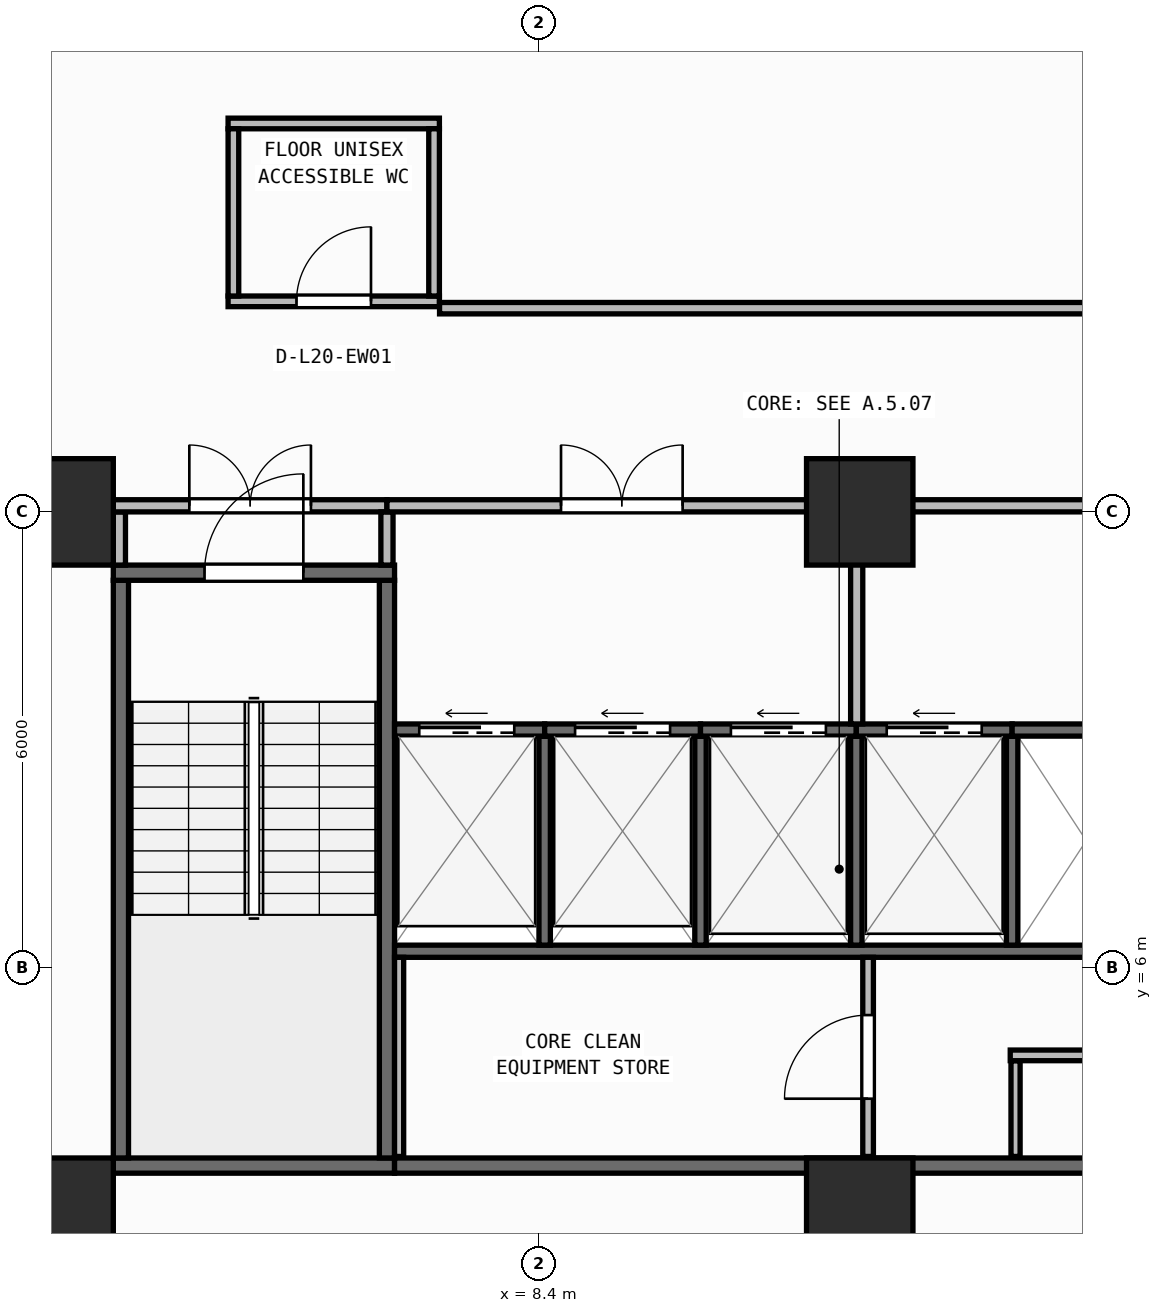
"""IFC4 building model, lengths in metres.
Left out: names, types, materials, properties, quantities, classifications, styles, units other than length and angle.
Written with IfcOpenShell. Run it as: python <this file> out.ifc"""

import sys

from ifc_helpers import new_model, si_unit, direction, frame, frame_2d, origin, origin_2d, place, context, subcontext, project, spatial, rectangle, extrude, element, fill, save


model = new_model("IFC4")
c1 = context("Model", 3, precision=1e-05, world=origin(), true_north=direction((0.0, 1.0)))
c2 = subcontext(c1, "Body", "Model", "MODEL_VIEW")
j1 = project(units=[si_unit("LENGTHUNIT", "METRE"), si_unit("PLANEANGLEUNIT", "RADIAN")], contexts=[c1])
p1 = place(None, origin())
s1 = spatial("IfcSite", under=j1, at=p1, CompositionType="ELEMENT")
p2 = place(p1, origin())
s2 = spatial("IfcBuilding", under=s1, at=p2, CompositionType="ELEMENT")
p3 = place(p2, frame((0.0, 0.0, 81.75)))
s3 = spatial("IfcBuildingStorey", under=s2, at=p3, CompositionType="ELEMENT", Elevation=81.75)
for number, where, z_axis, x_axis in (
    (1, (2.1, 2.8, 0.0), (0.0, 0.0, 1.0), (1.0, 0.0, 0.0)),
    (2, (12.62, 2.8, 0.0), (0.0, 0.0, 1.0), (1.0, 0.0, 0.0)),
    (3, (2.1, 12.0, 0.0), (0.0, 0.0, 1.0), (1.0, 0.0, 0.0)),
    (4, (12.62, 12.0, 0.0), (0.0, 0.0, 1.0), (1.0, 0.0, 0.0)),
):
    element("IfcColumn", number, at=place(p3, frame(where, z_axis=z_axis, x_axis=x_axis)), inside=s3, PredefinedType="COLUMN", context=c2, shape_type="SweptSolid", body=[
        extrude(rectangle(XDim=1.4, YDim=1.4, at=origin_2d()), origin(), (0.0, 0.0, 1.0), 3.95),
    ])
p4 = place(p3, frame((2.76, 0.174, 0.0), z_axis=(0.0, 0.0, 1.0), x_axis=(0.996571478456, 0.082736257641, 0.0)))
e5 = element("IfcWall", 5, at=p4, inside=s3, PredefinedType="STANDARD", context=c2, shape_type="SweptSolid", body=[
    extrude(rectangle(XDim=52.861, YDim=0.26, at=frame_2d((26.431, 0.0))), origin(), (0.0, 0.0, 1.0), 3.71),
])
p5 = place(p4, frame((25.231, 0.0, 0.9)))
e6 = element("IfcOpeningElement", 6, at=p5, cuts=e5, PredefinedType="OPENING", context=c2, shape_type="SweptSolid", body=[
    extrude(rectangle(XDim=2.4, YDim=1.65, at=frame_2d((1.2, 0.825))), frame((0.0, 0.14, 0.0), z_axis=(0.0, -1.0, 0.0), x_axis=(1.0, 0.0, 0.0)), (0.0, 0.0, 1.0), 0.28),
])
p6 = place(p3, frame((2.8, 3.4, 0.0), z_axis=(0.0, 0.0, 1.0), x_axis=(1.0, 0.0, 0.0)))
e7 = element("IfcWall", 7, at=p6, inside=s3, PredefinedType="SHEAR", context=c2, shape_type="SweptSolid", body=[
    extrude(rectangle(XDim=3.7, YDim=0.2, at=frame_2d((1.85, 0.0))), origin(), (0.0, 0.0, 1.0), 3.71),
])
for number, where, z_axis, x_axis in (
    (8, (2.9, 3.5, 0.0), (0.0, 0.0, 1.0), (0.0, 1.0, 0.0)),
    (9, (6.4, 3.5, 0.0), (0.0, 0.0, 1.0), (0.0, 1.0, 0.0)),
):
    element("IfcWall", number, at=place(p3, frame(where, z_axis=z_axis, x_axis=x_axis)), inside=s3, PredefinedType="SHEAR", context=c2, shape_type="SweptSolid", body=[
        extrude(rectangle(XDim=7.6, YDim=0.2, at=frame_2d((3.8, 0.0))), origin(), (0.0, 0.0, 1.0), 3.71),
    ])
p7 = place(p3, frame((2.8, 11.2, 0.0), z_axis=(0.0, 0.0, 1.0), x_axis=(1.0, 0.0, 0.0)))
e10 = element("IfcWall", 10, at=p7, inside=s3, PredefinedType="SHEAR", context=c2, shape_type="SweptSolid", body=[
    extrude(rectangle(XDim=3.7, YDim=0.2, at=frame_2d((1.85, 0.0))), origin(), (0.0, 0.0, 1.0), 3.71),
])
p8 = place(p7, frame((1.2, 0.0, 0.0)))
e11 = element("IfcOpeningElement", 11, at=p8, cuts=e10, PredefinedType="OPENING", context=c2, shape_type="SweptSolid", body=[
    extrude(rectangle(XDim=1.3, YDim=2.15, at=frame_2d((0.65, 1.075))), frame((0.0, 0.11, 0.0), z_axis=(0.0, -1.0, 0.0), x_axis=(1.0, 0.0, 0.0)), (0.0, 0.0, 1.0), 0.22),
])
p9 = place(p3, frame((6.5, 3.4, 0.0), z_axis=(0.0, 0.0, 1.0), x_axis=(1.0, 0.0, 0.0)))
e12 = element("IfcWall", 12, at=p9, inside=s3, PredefinedType="SHEAR", context=c2, shape_type="SweptSolid", body=[
    extrude(rectangle(XDim=13.7, YDim=0.2, at=frame_2d((6.85, 0.0))), origin(), (0.0, 0.0, 1.0), 3.71),
])
p10 = place(p3, frame((6.5, 6.22, 0.0), z_axis=(0.0, 0.0, 1.0), x_axis=(1.0, 0.0, 0.0)))
e13 = element("IfcWall", 13, at=p10, inside=s3, PredefinedType="SHEAR", context=c2, shape_type="SweptSolid", body=[
    extrude(rectangle(XDim=12.11, YDim=0.16, at=frame_2d((6.055, 0.0))), origin(), (0.0, 0.0, 1.0), 3.71),
])
for number, where, z_axis, x_axis in (
    (14, (8.475, 6.3, 0.0), (0.0, 0.0, 1.0), (0.0, 1.0, 0.0)),
    (15, (10.525, 6.3, 0.0), (0.0, 0.0, 1.0), (0.0, 1.0, 0.0)),
    (16, (12.575, 6.3, 0.0), (0.0, 0.0, 1.0), (0.0, 1.0, 0.0)),
    (17, (14.625, 6.3, 0.0), (0.0, 0.0, 1.0), (0.0, 1.0, 0.0)),
):
    element("IfcWall", number, at=place(p3, frame(where, z_axis=z_axis, x_axis=x_axis)), inside=s3, PredefinedType="SHEAR", context=c2, shape_type="SweptSolid", body=[
        extrude(rectangle(XDim=2.75, YDim=0.15, at=frame_2d((1.375, 0.0))), origin(), (0.0, 0.0, 1.0), 3.71),
    ])
p11 = place(p3, frame((6.5, 9.13, 0.0), z_axis=(0.0, 0.0, 1.0), x_axis=(1.0, 0.0, 0.0)))
e18 = element("IfcWall", 18, at=p11, inside=s3, PredefinedType="SHEAR", context=c2, shape_type="SweptSolid", body=[
    extrude(rectangle(XDim=1.975, YDim=0.16, at=frame_2d((0.988, 0.0))), origin(), (0.0, 0.0, 1.0), 3.71),
])
p12 = place(p11, frame((0.325, 0.0, 0.0)))
e19 = element("IfcOpeningElement", 19, at=p12, cuts=e18, PredefinedType="OPENING", context=c2, shape_type="SweptSolid", body=[
    extrude(rectangle(XDim=1.25, YDim=2.15, at=frame_2d((0.625, 1.075))), frame((0.0, 0.09, 0.0), z_axis=(0.0, -1.0, 0.0), x_axis=(1.0, 0.0, 0.0)), (0.0, 0.0, 1.0), 0.18),
])
p13 = place(p3, frame((8.475, 9.13, 0.0), z_axis=(0.0, 0.0, 1.0), x_axis=(1.0, 0.0, 0.0)))
e20 = element("IfcWall", 20, at=p13, inside=s3, PredefinedType="SHEAR", context=c2, shape_type="SweptSolid", body=[
    extrude(rectangle(XDim=2.05, YDim=0.16, at=frame_2d((1.025, 0.0))), origin(), (0.0, 0.0, 1.0), 3.71),
])
p14 = place(p13, frame((0.4, 0.0, 0.0)))
e21 = element("IfcOpeningElement", 21, at=p14, cuts=e20, PredefinedType="OPENING", context=c2, shape_type="SweptSolid", body=[
    extrude(rectangle(XDim=1.25, YDim=2.15, at=frame_2d((0.625, 1.075))), frame((0.0, 0.09, 0.0), z_axis=(0.0, -1.0, 0.0), x_axis=(1.0, 0.0, 0.0)), (0.0, 0.0, 1.0), 0.18),
])
p15 = place(p3, frame((10.525, 9.13, 0.0), z_axis=(0.0, 0.0, 1.0), x_axis=(1.0, 0.0, 0.0)))
e22 = element("IfcWall", 22, at=p15, inside=s3, PredefinedType="SHEAR", context=c2, shape_type="SweptSolid", body=[
    extrude(rectangle(XDim=2.05, YDim=0.16, at=frame_2d((1.025, 0.0))), origin(), (0.0, 0.0, 1.0), 3.71),
])
p16 = place(p15, frame((0.4, 0.0, 0.0)))
e23 = element("IfcOpeningElement", 23, at=p16, cuts=e22, PredefinedType="OPENING", context=c2, shape_type="SweptSolid", body=[
    extrude(rectangle(XDim=1.25, YDim=2.15, at=frame_2d((0.625, 1.075))), frame((0.0, 0.09, 0.0), z_axis=(0.0, -1.0, 0.0), x_axis=(1.0, 0.0, 0.0)), (0.0, 0.0, 1.0), 0.18),
])
p17 = place(p3, frame((12.575, 9.13, 0.0), z_axis=(0.0, 0.0, 1.0), x_axis=(1.0, 0.0, 0.0)))
e24 = element("IfcWall", 24, at=p17, inside=s3, PredefinedType="SHEAR", context=c2, shape_type="SweptSolid", body=[
    extrude(rectangle(XDim=2.05, YDim=0.16, at=frame_2d((1.025, 0.0))), origin(), (0.0, 0.0, 1.0), 3.71),
])
p18 = place(p17, frame((0.4, 0.0, 0.0)))
e25 = element("IfcOpeningElement", 25, at=p18, cuts=e24, PredefinedType="OPENING", context=c2, shape_type="SweptSolid", body=[
    extrude(rectangle(XDim=1.25, YDim=2.15, at=frame_2d((0.625, 1.075))), frame((0.0, 0.09, 0.0), z_axis=(0.0, -1.0, 0.0), x_axis=(1.0, 0.0, 0.0)), (0.0, 0.0, 1.0), 0.18),
])
p19 = place(p3, frame((14.625, 9.13, 0.0), z_axis=(0.0, 0.0, 1.0), x_axis=(1.0, 0.0, 0.0)))
e26 = element("IfcWall", 26, at=p19, inside=s3, PredefinedType="SHEAR", context=c2, shape_type="SweptSolid", body=[
    extrude(rectangle(XDim=1.95, YDim=0.16, at=frame_2d((0.975, 0.0))), origin(), (0.0, 0.0, 1.0), 3.71),
])
p20 = place(p3, frame((6.56, 3.52, 0.0), z_axis=(0.0, 0.0, 1.0), x_axis=(0.0, 1.0, 0.0)))
e27 = element("IfcWall", 27, at=p20, inside=s3, PredefinedType="PARTITIONING", context=c2, shape_type="SweptSolid", body=[
    extrude(rectangle(XDim=2.62, YDim=0.12, at=frame_2d((1.31, 0.0))), origin(), (0.0, 0.0, 1.0), 3.71),
])
p21 = place(p3, frame((12.73, 3.52, 0.0), z_axis=(0.0, 0.0, 1.0), x_axis=(0.0, 1.0, 0.0)))
e28 = element("IfcWall", 28, at=p21, inside=s3, PredefinedType="PARTITIONING", context=c2, shape_type="SweptSolid", body=[
    extrude(rectangle(XDim=2.62, YDim=0.14, at=frame_2d((1.31, 0.0))), origin(), (0.0, 0.0, 1.0), 3.71),
])
p22 = place(p21, frame((0.76, 0.0, 0.0)))
e29 = element("IfcOpeningElement", 29, at=p22, cuts=e28, PredefinedType="OPENING", context=c2, shape_type="SweptSolid", body=[
    extrude(rectangle(XDim=1.1, YDim=2.1, at=frame_2d((0.55, 1.05))), frame((0.0, 0.08, 0.0), z_axis=(0.0, -1.0, 0.0), x_axis=(1.0, 0.0, 0.0)), (0.0, 0.0, 1.0), 0.16),
])
p23 = place(p3, frame((14.67, 3.52, 0.0), z_axis=(0.0, 0.0, 1.0), x_axis=(0.0, 1.0, 0.0)))
e30 = element("IfcWall", 30, at=p23, inside=s3, PredefinedType="PARTITIONING", context=c2, shape_type="SweptSolid", body=[
    extrude(rectangle(XDim=1.26, YDim=0.12, at=frame_2d((0.63, 0.0))), origin(), (0.0, 0.0, 1.0), 3.71),
])
p24 = place(p3, frame((14.6, 4.85, 0.0), z_axis=(0.0, 0.0, 1.0), x_axis=(1.0, 0.0, 0.0)))
e31 = element("IfcWall", 31, at=p24, inside=s3, PredefinedType="PARTITIONING", context=c2, shape_type="SweptSolid", body=[
    extrude(rectangle(XDim=4.0, YDim=0.14, at=frame_2d((2.0, 0.0))), origin(), (0.0, 0.0, 1.0), 3.71),
])
p25 = place(p24, frame((1.51, 0.0, 0.0)))
e32 = element("IfcOpeningElement", 32, at=p25, cuts=e31, PredefinedType="OPENING", context=c2, shape_type="SweptSolid", body=[
    extrude(rectangle(XDim=0.98, YDim=2.1, at=frame_2d((0.49, 1.05))), frame((0.0, 0.08, 0.0), z_axis=(0.0, -1.0, 0.0), x_axis=(1.0, 0.0, 0.0)), (0.0, 0.0, 1.0), 0.16),
])
p26 = place(p3, frame((2.88, 11.3, 0.0), z_axis=(0.0, 0.0, 1.0), x_axis=(0.0, 1.0, 0.0)))
e33 = element("IfcWall", 33, at=p26, inside=s3, PredefinedType="PARTITIONING", context=c2, shape_type="SweptSolid", body=[
    extrude(rectangle(XDim=0.7, YDim=0.16, at=frame_2d((0.35, 0.0))), origin(), (0.0, 0.0, 1.0), 3.71),
])
p27 = place(p3, frame((2.8, 12.08, 0.0), z_axis=(0.0, 0.0, 1.0), x_axis=(1.0, 0.0, 0.0)))
e34 = element("IfcWall", 34, at=p27, inside=s3, PredefinedType="PARTITIONING", context=c2, shape_type="SweptSolid", body=[
    extrude(rectangle(XDim=3.6, YDim=0.16, at=frame_2d((1.8, 0.0))), origin(), (0.0, 0.0, 1.0), 3.073),
])
p28 = place(p27, frame((1.0, 0.0, 0.0)))
e35 = element("IfcOpeningElement", 35, at=p28, cuts=e34, PredefinedType="OPENING", context=c2, shape_type="SweptSolid", body=[
    extrude(rectangle(XDim=1.6, YDim=2.05, at=frame_2d((0.8, 1.025))), frame((0.0, 0.09, 0.0), z_axis=(0.0, -1.0, 0.0), x_axis=(1.0, 0.0, 0.0)), (0.0, 0.0, 1.0), 0.18),
])
p29 = place(p3, frame((6.4, 11.3, 0.0), z_axis=(0.0, 0.0, 1.0), x_axis=(0.0, 1.0, 0.0)))
e36 = element("IfcWall", 36, at=p29, inside=s3, PredefinedType="PARTITIONING", context=c2, shape_type="SweptSolid", body=[
    extrude(rectangle(XDim=0.7, YDim=0.16, at=frame_2d((0.35, 0.0))), origin(), (0.0, 0.0, 1.0), 3.71),
])
p30 = place(p3, frame((6.4, 12.08, 0.0), z_axis=(0.0, 0.0, 1.0), x_axis=(1.0, 0.0, 0.0)))
e37 = element("IfcWall", 37, at=p30, inside=s3, PredefinedType="PARTITIONING", context=c2, shape_type="SweptSolid", body=[
    extrude(rectangle(XDim=6.18, YDim=0.16, at=frame_2d((3.09, 0.0))), origin(), (0.0, 0.0, 1.0), 3.073),
])
p31 = place(p30, frame((2.29, 0.0, 0.0)))
e38 = element("IfcOpeningElement", 38, at=p31, cuts=e37, PredefinedType="OPENING", context=c2, shape_type="SweptSolid", body=[
    extrude(rectangle(XDim=1.6, YDim=2.05, at=frame_2d((0.8, 1.025))), frame((0.0, 0.09, 0.0), z_axis=(0.0, -1.0, 0.0), x_axis=(1.0, 0.0, 0.0)), (0.0, 0.0, 1.0), 0.18),
])
p32 = place(p3, frame((12.58, 9.21, 0.0), z_axis=(0.0, 0.0, 1.0), x_axis=(0.0, 1.0, 0.0)))
e39 = element("IfcWall", 39, at=p32, inside=s3, PredefinedType="PARTITIONING", context=c2, shape_type="SweptSolid", body=[
    extrude(rectangle(XDim=2.79, YDim=0.16, at=frame_2d((1.395, 0.0))), origin(), (0.0, 0.0, 1.0), 3.71),
])
p33 = place(p3, frame((12.58, 12.08, 0.0), z_axis=(0.0, 0.0, 1.0), x_axis=(1.0, 0.0, 0.0)))
e40 = element("IfcWall", 40, at=p33, inside=s3, PredefinedType="PARTITIONING", context=c2, shape_type="SweptSolid", body=[
    extrude(rectangle(XDim=7.7, YDim=0.16, at=frame_2d((3.85, 0.0))), origin(), (0.0, 0.0, 1.0), 3.073),
])
p34 = place(p33, frame((3.05, 0.0, 0.0)))
e41 = element("IfcOpeningElement", 41, at=p34, cuts=e40, PredefinedType="OPENING", context=c2, shape_type="SweptSolid", body=[
    extrude(rectangle(XDim=1.6, YDim=2.05, at=frame_2d((0.8, 1.025))), frame((0.0, 0.09, 0.0), z_axis=(0.0, -1.0, 0.0), x_axis=(1.0, 0.0, 0.0)), (0.0, 0.0, 1.0), 0.18),
])
p35 = place(p3, frame((4.31, 14.77, 0.0), z_axis=(0.0, 0.0, 1.0), x_axis=(1.0, 0.0, 0.0)))
e42 = element("IfcWall", 42, at=p35, inside=s3, PredefinedType="PARTITIONING", context=c2, shape_type="SweptSolid", body=[
    extrude(rectangle(XDim=2.78, YDim=0.14, at=frame_2d((1.39, 0.0))), origin(), (0.0, 0.0, 1.0), 3.71),
])
p36 = place(p35, frame((0.9, 0.0, 0.0)))
e43 = element("IfcOpeningElement", 43, at=p36, cuts=e42, PredefinedType="OPENING", context=c2, shape_type="SweptSolid", body=[
    extrude(rectangle(XDim=0.98, YDim=2.1, at=frame_2d((0.49, 1.05))), frame((0.0, 0.08, 0.0), z_axis=(0.0, -1.0, 0.0), x_axis=(1.0, 0.0, 0.0)), (0.0, 0.0, 1.0), 0.16),
])
p37 = place(p3, frame((4.31, 17.11, 0.0), z_axis=(0.0, 0.0, 1.0), x_axis=(1.0, 0.0, 0.0)))
e44 = element("IfcWall", 44, at=p37, inside=s3, PredefinedType="PARTITIONING", context=c2, shape_type="SweptSolid", body=[
    extrude(rectangle(XDim=2.78, YDim=0.14, at=frame_2d((1.39, 0.0))), origin(), (0.0, 0.0, 1.0), 3.71),
])
for number, where, z_axis, x_axis in (
    (45, (4.38, 14.84, 0.0), (0.0, 0.0, 1.0), (0.0, 1.0, 0.0)),
    (46, (7.02, 14.84, 0.0), (0.0, 0.0, 1.0), (0.0, 1.0, 0.0)),
):
    element("IfcWall", number, at=place(p3, frame(where, z_axis=z_axis, x_axis=x_axis)), inside=s3, PredefinedType="PARTITIONING", context=c2, shape_type="SweptSolid", body=[
        extrude(rectangle(XDim=2.2, YDim=0.14, at=frame_2d((1.1, 0.0))), origin(), (0.0, 0.0, 1.0), 3.71),
    ])
p38 = place(p3, frame((27.546, 14.68, 0.0), z_axis=(0.0, 0.0, 1.0), x_axis=(-1.0, 0.0, 0.0)))
e47 = element("IfcWall", 47, at=p38, inside=s3, PredefinedType="PARTITIONING", context=c2, shape_type="SweptSolid", body=[
    extrude(rectangle(XDim=20.454, YDim=0.15, at=frame_2d((10.227, 0.0))), origin(), (0.0, 0.0, 1.0), 3.71),
])
p39 = place(p38, frame((9.677, 0.0, 0.0)))
e48 = element("IfcOpeningElement", 48, at=p39, cuts=e47, PredefinedType="OPENING", context=c2, shape_type="SweptSolid", body=[
    extrude(rectangle(XDim=1.1, YDim=2.1, at=frame_2d((0.55, 1.05))), frame((0.0, 0.085, 0.0), z_axis=(0.0, -1.0, 0.0), x_axis=(1.0, 0.0, 0.0)), (0.0, 0.0, 1.0), 0.17),
])
p40 = place(p8, origin())
e49 = element("IfcDoor", 49, at=p40, inside=s3, OperationType="SINGLE_SWING_RIGHT", PredefinedType="DOOR", context=c2, shape_type="SweptSolid", body=[
    extrude(rectangle(XDim=1.3, YDim=2.15, at=frame_2d((0.65, 1.075))), frame((0.0, 0.025, 0.0), z_axis=(0.0, -1.0, 0.0), x_axis=(1.0, 0.0, 0.0)), (0.0, 0.0, 1.0), 0.05),
])
fill(e11, e49)
p41 = place(p12, origin())
e50 = element("IfcDoor", 50, at=p41, inside=s3, OperationType="SLIDING_TO_LEFT", PredefinedType="DOOR", context=c2, shape_type="SweptSolid", body=[
    extrude(rectangle(XDim=1.25, YDim=2.15, at=frame_2d((0.625, 1.075))), frame((0.0, 0.025, 0.0), z_axis=(0.0, -1.0, 0.0), x_axis=(1.0, 0.0, 0.0)), (0.0, 0.0, 1.0), 0.05),
])
fill(e19, e50)
p42 = place(p14, origin())
e51 = element("IfcDoor", 51, at=p42, inside=s3, OperationType="SLIDING_TO_LEFT", PredefinedType="DOOR", context=c2, shape_type="SweptSolid", body=[
    extrude(rectangle(XDim=1.25, YDim=2.15, at=frame_2d((0.625, 1.075))), frame((0.0, 0.025, 0.0), z_axis=(0.0, -1.0, 0.0), x_axis=(1.0, 0.0, 0.0)), (0.0, 0.0, 1.0), 0.05),
])
fill(e21, e51)
p43 = place(p16, origin())
e52 = element("IfcDoor", 52, at=p43, inside=s3, OperationType="SLIDING_TO_LEFT", PredefinedType="DOOR", context=c2, shape_type="SweptSolid", body=[
    extrude(rectangle(XDim=1.25, YDim=2.15, at=frame_2d((0.625, 1.075))), frame((0.0, 0.025, 0.0), z_axis=(0.0, -1.0, 0.0), x_axis=(1.0, 0.0, 0.0)), (0.0, 0.0, 1.0), 0.05),
])
fill(e23, e52)
p44 = place(p18, origin())
e53 = element("IfcDoor", 53, at=p44, inside=s3, OperationType="SLIDING_TO_LEFT", PredefinedType="DOOR", context=c2, shape_type="SweptSolid", body=[
    extrude(rectangle(XDim=1.25, YDim=2.15, at=frame_2d((0.625, 1.075))), frame((0.0, 0.025, 0.0), z_axis=(0.0, -1.0, 0.0), x_axis=(1.0, 0.0, 0.0)), (0.0, 0.0, 1.0), 0.05),
])
fill(e25, e53)
p45 = place(p22, origin())
e54 = element("IfcDoor", 54, at=p45, inside=s3, OperationType="SINGLE_SWING_LEFT", PredefinedType="DOOR", context=c2, shape_type="SweptSolid", body=[
    extrude(rectangle(XDim=1.1, YDim=2.1, at=frame_2d((0.55, 1.05))), frame((0.0, 0.025, 0.0), z_axis=(0.0, -1.0, 0.0), x_axis=(1.0, 0.0, 0.0)), (0.0, 0.0, 1.0), 0.05),
])
fill(e29, e54)
p46 = place(p28, origin())
e55 = element("IfcDoor", 55, at=p46, inside=s3, OperationType="DOUBLE_DOOR_SINGLE_SWING", PredefinedType="DOOR", context=c2, shape_type="SweptSolid", body=[
    extrude(rectangle(XDim=1.6, YDim=2.05, at=frame_2d((0.8, 1.025))), frame((0.0, 0.025, 0.0), z_axis=(0.0, -1.0, 0.0), x_axis=(1.0, 0.0, 0.0)), (0.0, 0.0, 1.0), 0.05),
])
fill(e35, e55)
p47 = place(p31, origin())
e56 = element("IfcDoor", 56, at=p47, inside=s3, OperationType="DOUBLE_DOOR_SINGLE_SWING", PredefinedType="DOOR", context=c2, shape_type="SweptSolid", body=[
    extrude(rectangle(XDim=1.6, YDim=2.05, at=frame_2d((0.8, 1.025))), frame((0.0, 0.025, 0.0), z_axis=(0.0, -1.0, 0.0), x_axis=(1.0, 0.0, 0.0)), (0.0, 0.0, 1.0), 0.05),
])
fill(e38, e56)
p48 = place(p36, origin())
e57 = element("IfcDoor", 57, at=p48, inside=s3, OperationType="SINGLE_SWING_RIGHT", PredefinedType="DOOR", context=c2, shape_type="SweptSolid", body=[
    extrude(rectangle(XDim=0.98, YDim=2.1, at=frame_2d((0.49, 1.05))), frame((0.0, 0.025, 0.0), z_axis=(0.0, -1.0, 0.0), x_axis=(1.0, 0.0, 0.0)), (0.0, 0.0, 1.0), 0.05),
])
fill(e43, e57)
save(model, sys.argv[1])
